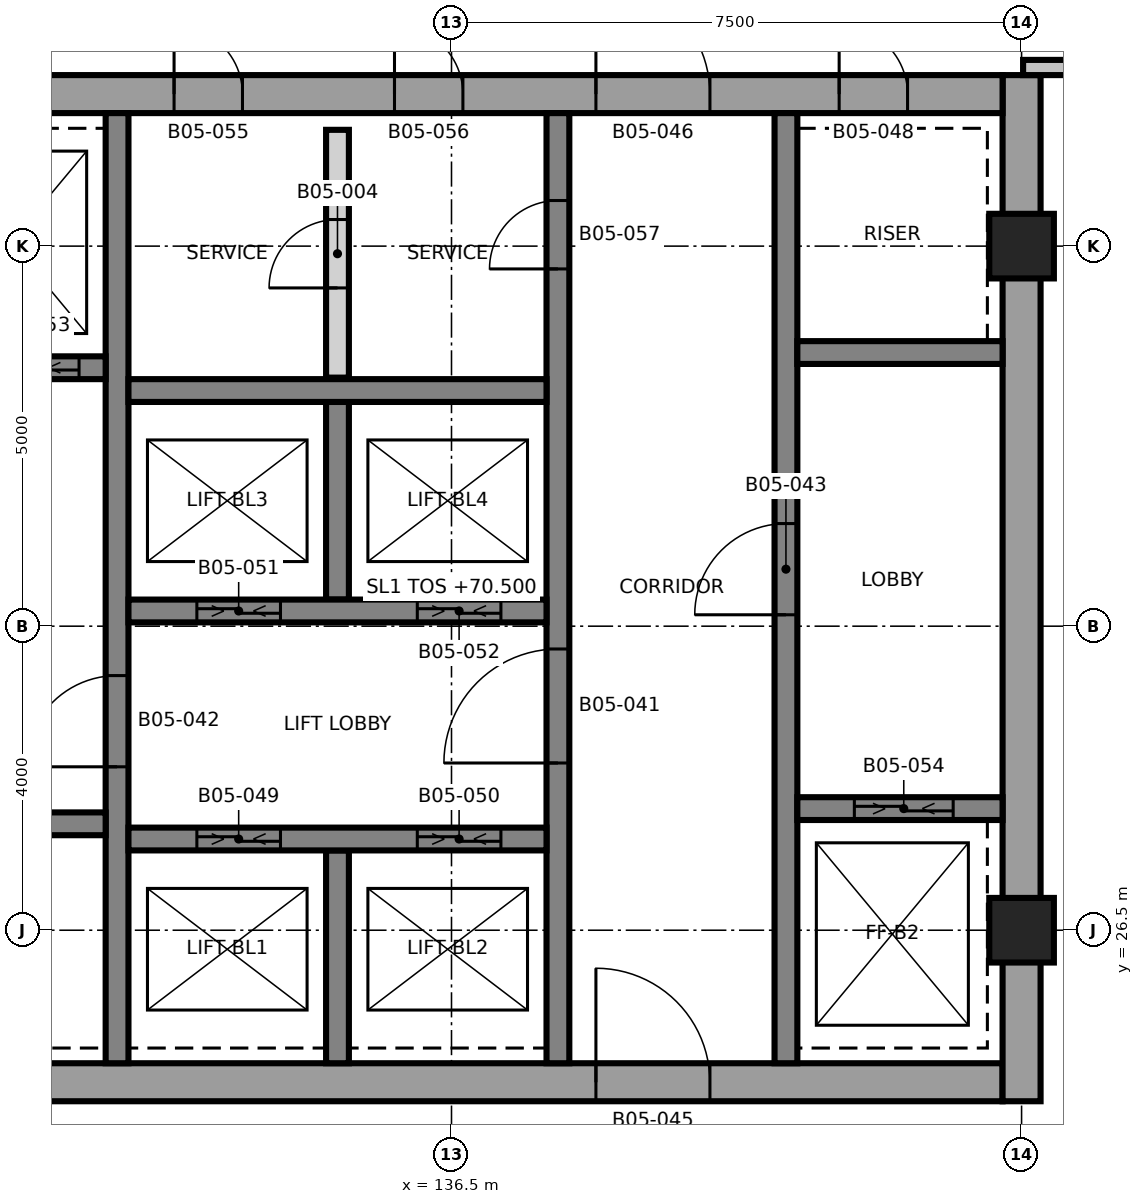
"""IFC4 building model, lengths in metres.
Left out: names, types, materials, properties, quantities, classifications, styles, units other than length and angle.
Written with IfcOpenShell. Run it as: python <this file> out.ifc"""

import sys

from ifc_helpers import new_model, si_unit, direction, frame, frame_2d, origin, origin_2d, place, context, subcontext, project, spatial, rectangle, extrude, element, fill, save


model = new_model("IFC4")
c1 = context("Model", 3, precision=1e-05, world=origin(), true_north=direction((0.0, 1.0)))
c2 = subcontext(c1, "Body", "Model", "MODEL_VIEW")
j1 = project(units=[si_unit("LENGTHUNIT", "METRE"), si_unit("PLANEANGLEUNIT", "RADIAN")], contexts=[c1])
p1 = place(None, origin())
s1 = spatial("IfcSite", under=j1, at=p1, CompositionType="ELEMENT")
p2 = place(p1, origin())
s2 = spatial("IfcBuilding", under=s1, at=p2, CompositionType="ELEMENT")
p3 = place(p2, frame((0.0, 0.0, 70.5)))
s3 = spatial("IfcBuildingStorey", under=s2, at=p3, CompositionType="ELEMENT", Elevation=70.5)
p4 = place(p3, frame((128.75, 24.5, 0.0), z_axis=(0.0, 0.0, 1.0), x_axis=(1.0, 0.0, 0.0)))
e1 = element("IfcWall", 1, at=p4, inside=s3, PredefinedType="SHEAR", context=c2, shape_type="SweptSolid", body=[
    extrude(rectangle(XDim=15.0, YDim=0.5, at=frame_2d((7.5, 0.0))), origin(), (0.0, 0.0, 1.0), 3.7),
])
p5 = place(p4, frame((9.65, 0.0, 0.0)))
e2 = element("IfcOpeningElement", 2, at=p5, cuts=e1, PredefinedType="OPENING", context=c2, shape_type="SweptSolid", body=[
    extrude(rectangle(XDim=1.5, YDim=2.1, at=frame_2d((0.75, 1.05))), frame((0.0, 0.26, 0.0), z_axis=(0.0, -1.0, 0.0), x_axis=(1.0, 0.0, 0.0)), (0.0, 0.0, 1.0), 0.52),
])
p6 = place(p4, frame((1.25, 0.0, 0.0)))
e3 = element("IfcOpeningElement", 3, at=p6, cuts=e1, PredefinedType="OPENING", context=c2, shape_type="SweptSolid", body=[
    extrude(rectangle(XDim=0.9, YDim=2.1, at=frame_2d((0.45, 1.05))), frame((0.0, 0.26, 0.0), z_axis=(0.0, -1.0, 0.0), x_axis=(1.0, 0.0, 0.0)), (0.0, 0.0, 1.0), 0.52),
])
p7 = place(p3, frame((144.0, 24.25, 0.0), z_axis=(0.0, 0.0, 1.0), x_axis=(0.0, 1.0, 0.0)))
e4 = element("IfcWall", 4, at=p7, inside=s3, PredefinedType="SHEAR", context=c2, shape_type="SweptSolid", body=[
    extrude(rectangle(XDim=13.5, YDim=0.5, at=frame_2d((6.75, 0.0))), origin(), (0.0, 0.0, 1.0), 3.7),
])
p8 = place(p3, frame((128.75, 37.5, 0.0), z_axis=(0.0, 0.0, 1.0), x_axis=(1.0, 0.0, 0.0)))
e5 = element("IfcWall", 5, at=p8, inside=s3, PredefinedType="SHEAR", context=c2, shape_type="SweptSolid", body=[
    extrude(rectangle(XDim=15.0, YDim=0.5, at=frame_2d((7.5, 0.0))), origin(), (0.0, 0.0, 1.0), 3.7),
])
p9 = place(p8, frame((9.65, 0.0, 0.0)))
e6 = element("IfcOpeningElement", 6, at=p9, cuts=e5, PredefinedType="OPENING", context=c2, shape_type="SweptSolid", body=[
    extrude(rectangle(XDim=1.5, YDim=2.1, at=frame_2d((0.75, 1.05))), frame((0.0, 0.26, 0.0), z_axis=(0.0, -1.0, 0.0), x_axis=(1.0, 0.0, 0.0)), (0.0, 0.0, 1.0), 0.52),
])
p10 = place(p8, frame((12.85, 0.0, 0.0)))
e7 = element("IfcOpeningElement", 7, at=p10, cuts=e5, PredefinedType="OPENING", context=c2, shape_type="SweptSolid", body=[
    extrude(rectangle(XDim=0.9, YDim=2.1, at=frame_2d((0.45, 1.05))), frame((0.0, 0.26, 0.0), z_axis=(0.0, -1.0, 0.0), x_axis=(1.0, 0.0, 0.0)), (0.0, 0.0, 1.0), 0.52),
])
p11 = place(p8, frame((4.1, 0.0, 0.0)))
e8 = element("IfcOpeningElement", 8, at=p11, cuts=e5, PredefinedType="OPENING", context=c2, shape_type="SweptSolid", body=[
    extrude(rectangle(XDim=0.9, YDim=2.1, at=frame_2d((0.45, 1.05))), frame((0.0, 0.26, 0.0), z_axis=(0.0, -1.0, 0.0), x_axis=(1.0, 0.0, 0.0)), (0.0, 0.0, 1.0), 0.52),
])
p12 = place(p8, frame((7.0, 0.0, 0.0)))
e9 = element("IfcOpeningElement", 9, at=p12, cuts=e5, PredefinedType="OPENING", context=c2, shape_type="SweptSolid", body=[
    extrude(rectangle(XDim=0.9, YDim=2.1, at=frame_2d((0.45, 1.05))), frame((0.0, 0.26, 0.0), z_axis=(0.0, -1.0, 0.0), x_axis=(1.0, 0.0, 0.0)), (0.0, 0.0, 1.0), 0.52),
])
p13 = place(p3, frame((132.1, 24.75, 0.0), z_axis=(0.0, 0.0, 1.0), x_axis=(0.0, 1.0, 0.0)))
e10 = element("IfcWall", 10, at=p13, inside=s3, PredefinedType="SHEAR", context=c2, shape_type="SweptSolid", body=[
    extrude(rectangle(XDim=12.5, YDim=0.3, at=frame_2d((6.25, 0.0))), origin(), (0.0, 0.0, 1.0), 3.7),
])
p14 = place(p13, frame((3.9, 0.0, 0.0)))
e11 = element("IfcOpeningElement", 11, at=p14, cuts=e10, PredefinedType="OPENING", context=c2, shape_type="SweptSolid", body=[
    extrude(rectangle(XDim=1.2, YDim=2.1, at=frame_2d((0.6, 1.05))), frame((0.0, 0.16, 0.0), z_axis=(0.0, -1.0, 0.0), x_axis=(1.0, 0.0, 0.0)), (0.0, 0.0, 1.0), 0.32),
])
p15 = place(p3, frame((137.9, 24.75, 0.0), z_axis=(0.0, 0.0, 1.0), x_axis=(0.0, 1.0, 0.0)))
e12 = element("IfcWall", 12, at=p15, inside=s3, PredefinedType="SHEAR", context=c2, shape_type="SweptSolid", body=[
    extrude(rectangle(XDim=12.5, YDim=0.3, at=frame_2d((6.25, 0.0))), origin(), (0.0, 0.0, 1.0), 3.7),
])
p16 = place(p15, frame((3.95, 0.0, 0.0)))
e13 = element("IfcOpeningElement", 13, at=p16, cuts=e12, PredefinedType="OPENING", context=c2, shape_type="SweptSolid", body=[
    extrude(rectangle(XDim=1.5, YDim=2.1, at=frame_2d((0.75, 1.05))), frame((0.0, 0.16, 0.0), z_axis=(0.0, -1.0, 0.0), x_axis=(1.0, 0.0, 0.0)), (0.0, 0.0, 1.0), 0.32),
])
p17 = place(p15, frame((10.45, 0.0, 0.0)))
e14 = element("IfcOpeningElement", 14, at=p17, cuts=e12, PredefinedType="OPENING", context=c2, shape_type="SweptSolid", body=[
    extrude(rectangle(XDim=0.9, YDim=2.1, at=frame_2d((0.45, 1.05))), frame((0.0, 0.16, 0.0), z_axis=(0.0, -1.0, 0.0), x_axis=(1.0, 0.0, 0.0)), (0.0, 0.0, 1.0), 0.32),
])
p18 = place(p3, frame((140.9, 24.75, 0.0), z_axis=(0.0, 0.0, 1.0), x_axis=(0.0, 1.0, 0.0)))
e15 = element("IfcWall", 15, at=p18, inside=s3, PredefinedType="SHEAR", context=c2, shape_type="SweptSolid", body=[
    extrude(rectangle(XDim=12.5, YDim=0.3, at=frame_2d((6.25, 0.0))), origin(), (0.0, 0.0, 1.0), 3.7),
])
p19 = place(p18, frame((5.9, 0.0, 0.0)))
e16 = element("IfcOpeningElement", 16, at=p19, cuts=e15, PredefinedType="OPENING", context=c2, shape_type="SweptSolid", body=[
    extrude(rectangle(XDim=1.2, YDim=2.1, at=frame_2d((0.6, 1.05))), frame((0.0, 0.16, 0.0), z_axis=(0.0, -1.0, 0.0), x_axis=(1.0, 0.0, 0.0)), (0.0, 0.0, 1.0), 0.32),
])
p20 = place(p3, frame((135.0, 24.75, 0.0), z_axis=(0.0, 0.0, 1.0), x_axis=(0.0, 1.0, 0.0)))
e17 = element("IfcWall", 17, at=p20, inside=s3, PredefinedType="SHEAR", context=c2, shape_type="SweptSolid", body=[
    extrude(rectangle(XDim=2.8, YDim=0.3, at=frame_2d((1.4, 0.0))), origin(), (0.0, 0.0, 1.0), 3.7),
])
p21 = place(p3, frame((135.0, 30.85, 0.0), z_axis=(0.0, 0.0, 1.0), x_axis=(0.0, 1.0, 0.0)))
e18 = element("IfcWall", 18, at=p21, inside=s3, PredefinedType="SHEAR", context=c2, shape_type="SweptSolid", body=[
    extrude(rectangle(XDim=2.6, YDim=0.3, at=frame_2d((1.3, 0.0))), origin(), (0.0, 0.0, 1.0), 3.7),
])
p22 = place(p3, frame((132.25, 27.7, 0.0), z_axis=(0.0, 0.0, 1.0), x_axis=(1.0, 0.0, 0.0)))
e19 = element("IfcWall", 19, at=p22, inside=s3, PredefinedType="SHEAR", context=c2, shape_type="SweptSolid", body=[
    extrude(rectangle(XDim=5.5, YDim=0.3, at=frame_2d((2.75, 0.0))), origin(), (0.0, 0.0, 1.0), 3.7),
])
p23 = place(p22, frame((0.9, 0.0, 0.0)))
e20 = element("IfcOpeningElement", 20, at=p23, cuts=e19, PredefinedType="OPENING", context=c2, shape_type="SweptSolid", body=[
    extrude(rectangle(XDim=1.1, YDim=2.4, at=frame_2d((0.55, 1.2))), frame((0.0, 0.16, 0.0), z_axis=(0.0, -1.0, 0.0), x_axis=(1.0, 0.0, 0.0)), (0.0, 0.0, 1.0), 0.32),
])
p24 = place(p22, frame((3.8, 0.0, 0.0)))
e21 = element("IfcOpeningElement", 21, at=p24, cuts=e19, PredefinedType="OPENING", context=c2, shape_type="SweptSolid", body=[
    extrude(rectangle(XDim=1.1, YDim=2.4, at=frame_2d((0.55, 1.2))), frame((0.0, 0.16, 0.0), z_axis=(0.0, -1.0, 0.0), x_axis=(1.0, 0.0, 0.0)), (0.0, 0.0, 1.0), 0.32),
])
p25 = place(p3, frame((132.25, 30.7, 0.0), z_axis=(0.0, 0.0, 1.0), x_axis=(1.0, 0.0, 0.0)))
e22 = element("IfcWall", 22, at=p25, inside=s3, PredefinedType="SHEAR", context=c2, shape_type="SweptSolid", body=[
    extrude(rectangle(XDim=5.5, YDim=0.3, at=frame_2d((2.75, 0.0))), origin(), (0.0, 0.0, 1.0), 3.7),
])
p26 = place(p25, frame((0.9, 0.0, 0.0)))
e23 = element("IfcOpeningElement", 23, at=p26, cuts=e22, PredefinedType="OPENING", context=c2, shape_type="SweptSolid", body=[
    extrude(rectangle(XDim=1.1, YDim=2.4, at=frame_2d((0.55, 1.2))), frame((0.0, 0.16, 0.0), z_axis=(0.0, -1.0, 0.0), x_axis=(1.0, 0.0, 0.0)), (0.0, 0.0, 1.0), 0.32),
])
p27 = place(p25, frame((3.8, 0.0, 0.0)))
e24 = element("IfcOpeningElement", 24, at=p27, cuts=e22, PredefinedType="OPENING", context=c2, shape_type="SweptSolid", body=[
    extrude(rectangle(XDim=1.1, YDim=2.4, at=frame_2d((0.55, 1.2))), frame((0.0, 0.16, 0.0), z_axis=(0.0, -1.0, 0.0), x_axis=(1.0, 0.0, 0.0)), (0.0, 0.0, 1.0), 0.32),
])
p28 = place(p3, frame((132.25, 33.6, 0.0), z_axis=(0.0, 0.0, 1.0), x_axis=(1.0, 0.0, 0.0)))
e25 = element("IfcWall", 25, at=p28, inside=s3, PredefinedType="SHEAR", context=c2, shape_type="SweptSolid", body=[
    extrude(rectangle(XDim=5.5, YDim=0.3, at=frame_2d((2.75, 0.0))), origin(), (0.0, 0.0, 1.0), 3.7),
])
p29 = place(p3, frame((129.25, 27.9, 0.0), z_axis=(0.0, 0.0, 1.0), x_axis=(1.0, 0.0, 0.0)))
e26 = element("IfcWall", 26, at=p29, inside=s3, PredefinedType="SHEAR", context=c2, shape_type="SweptSolid", body=[
    extrude(rectangle(XDim=2.7, YDim=0.3, at=frame_2d((1.35, 0.0))), origin(), (0.0, 0.0, 1.0), 3.7),
])
p30 = place(p3, frame((129.25, 33.9, 0.0), z_axis=(0.0, 0.0, 1.0), x_axis=(1.0, 0.0, 0.0)))
e27 = element("IfcWall", 27, at=p30, inside=s3, PredefinedType="SHEAR", context=c2, shape_type="SweptSolid", body=[
    extrude(rectangle(XDim=2.7, YDim=0.3, at=frame_2d((1.35, 0.0))), origin(), (0.0, 0.0, 1.0), 3.7),
])
p31 = place(p30, frame((1.05, 0.0, 0.0)))
e28 = element("IfcOpeningElement", 28, at=p31, cuts=e27, PredefinedType="OPENING", context=c2, shape_type="SweptSolid", body=[
    extrude(rectangle(XDim=1.3, YDim=2.4, at=frame_2d((0.65, 1.2))), frame((0.0, 0.16, 0.0), z_axis=(0.0, -1.0, 0.0), x_axis=(1.0, 0.0, 0.0)), (0.0, 0.0, 1.0), 0.32),
])
p32 = place(p3, frame((141.05, 28.1, 0.0), z_axis=(0.0, 0.0, 1.0), x_axis=(1.0, 0.0, 0.0)))
e29 = element("IfcWall", 29, at=p32, inside=s3, PredefinedType="SHEAR", context=c2, shape_type="SweptSolid", body=[
    extrude(rectangle(XDim=2.7, YDim=0.3, at=frame_2d((1.35, 0.0))), origin(), (0.0, 0.0, 1.0), 3.7),
])
p33 = place(p32, frame((0.75, 0.0, 0.0)))
e30 = element("IfcOpeningElement", 30, at=p33, cuts=e29, PredefinedType="OPENING", context=c2, shape_type="SweptSolid", body=[
    extrude(rectangle(XDim=1.3, YDim=2.4, at=frame_2d((0.65, 1.2))), frame((0.0, 0.16, 0.0), z_axis=(0.0, -1.0, 0.0), x_axis=(1.0, 0.0, 0.0)), (0.0, 0.0, 1.0), 0.32),
])
p34 = place(p3, frame((141.05, 34.1, 0.0), z_axis=(0.0, 0.0, 1.0), x_axis=(1.0, 0.0, 0.0)))
e31 = element("IfcWall", 31, at=p34, inside=s3, PredefinedType="SHEAR", context=c2, shape_type="SweptSolid", body=[
    extrude(rectangle(XDim=2.7, YDim=0.3, at=frame_2d((1.35, 0.0))), origin(), (0.0, 0.0, 1.0), 3.7),
])
for number, where, z_axis, x_axis in (
    (32, (144.0, 26.5, 0.0), (0.0, 0.0, 1.0), (1.0, 0.0, 0.0)),
    (33, (144.0, 35.5, 0.0), (0.0, 0.0, 1.0), (1.0, 0.0, 0.0)),
):
    element("IfcColumn", number, at=place(p3, frame(where, z_axis=z_axis, x_axis=x_axis)), inside=s3, PredefinedType="COLUMN", context=c2, shape_type="SweptSolid", body=[
        extrude(rectangle(XDim=0.85, YDim=0.85, at=origin_2d()), origin(), (0.0, 0.0, 1.0), 3.7),
    ])
p35 = place(p3, frame((144.02, 37.85, 0.0), z_axis=(0.0, 0.0, 1.0), x_axis=(1.0, 0.0, 0.0)))
e34 = element("IfcWall", 34, at=p35, inside=s3, PredefinedType="PARTITIONING", context=c2, shape_type="SweptSolid", body=[
    extrude(rectangle(XDim=3.23, YDim=0.2, at=frame_2d((1.615, 0.0))), origin(), (0.0, 0.0, 1.0), 3.4),
])
p36 = place(p35, frame((1.03, 0.0, 0.0)))
e35 = element("IfcOpeningElement", 35, at=p36, cuts=e34, PredefinedType="OPENING", context=c2, shape_type="SweptSolid", body=[
    extrude(rectangle(XDim=1.5, YDim=2.1, at=frame_2d((0.75, 1.05))), frame((0.0, 0.11, 0.0), z_axis=(0.0, -1.0, 0.0), x_axis=(1.0, 0.0, 0.0)), (0.0, 0.0, 1.0), 0.22),
])
p37 = place(p3, frame((135.0, 33.77, 0.0), z_axis=(0.0, 0.0, 1.0), x_axis=(0.0, 1.0, 0.0)))
e36 = element("IfcWall", 36, at=p37, inside=s3, PredefinedType="PARTITIONING", context=c2, shape_type="SweptSolid", body=[
    extrude(rectangle(XDim=3.26, YDim=0.3, at=frame_2d((1.63, 0.0))), origin(), (0.0, 0.0, 1.0), 3.4),
])
p38 = place(p37, frame((1.18, 0.0, 0.0)))
e37 = element("IfcOpeningElement", 37, at=p38, cuts=e36, PredefinedType="OPENING", context=c2, shape_type="SweptSolid", body=[
    extrude(rectangle(XDim=0.9, YDim=2.1, at=frame_2d((0.45, 1.05))), frame((0.0, 0.16, 0.0), z_axis=(0.0, -1.0, 0.0), x_axis=(1.0, 0.0, 0.0)), (0.0, 0.0, 1.0), 0.32),
])
p39 = place(p38, origin())
e38 = element("IfcDoor", 38, at=p39, inside=s3, OperationType="SINGLE_SWING_RIGHT", PredefinedType="DOOR", context=c2, shape_type="SweptSolid", body=[
    extrude(rectangle(XDim=0.9, YDim=2.1, at=frame_2d((0.45, 1.05))), frame((0.0, 0.025, 0.0), z_axis=(0.0, -1.0, 0.0), x_axis=(1.0, 0.0, 0.0)), (0.0, 0.0, 1.0), 0.05),
])
fill(e37, e38)
p40 = place(p16, origin())
e39 = element("IfcDoor", 39, at=p40, inside=s3, OperationType="SINGLE_SWING_RIGHT", PredefinedType="DOOR", context=c2, shape_type="SweptSolid", body=[
    extrude(rectangle(XDim=1.5, YDim=2.1, at=frame_2d((0.75, 1.05))), frame((0.0, 0.025, 0.0), z_axis=(0.0, -1.0, 0.0), x_axis=(1.0, 0.0, 0.0)), (0.0, 0.0, 1.0), 0.05),
])
fill(e13, e39)
p41 = place(p14, origin())
e40 = element("IfcDoor", 40, at=p41, inside=s3, OperationType="SINGLE_SWING_LEFT", PredefinedType="DOOR", context=c2, shape_type="SweptSolid", body=[
    extrude(rectangle(XDim=1.2, YDim=2.1, at=frame_2d((0.6, 1.05))), frame((0.0, 0.025, 0.0), z_axis=(0.0, -1.0, 0.0), x_axis=(1.0, 0.0, 0.0)), (0.0, 0.0, 1.0), 0.05),
])
fill(e11, e40)
p42 = place(p19, origin())
e41 = element("IfcDoor", 41, at=p42, inside=s3, OperationType="SINGLE_SWING_RIGHT", PredefinedType="DOOR", context=c2, shape_type="SweptSolid", body=[
    extrude(rectangle(XDim=1.2, YDim=2.1, at=frame_2d((0.6, 1.05))), frame((0.0, 0.025, 0.0), z_axis=(0.0, -1.0, 0.0), x_axis=(1.0, 0.0, 0.0)), (0.0, 0.0, 1.0), 0.05),
])
fill(e16, e41)
p43 = place(p5, origin())
e42 = element("IfcDoor", 42, at=p43, inside=s3, OperationType="SINGLE_SWING_LEFT", PredefinedType="DOOR", context=c2, shape_type="SweptSolid", body=[
    extrude(rectangle(XDim=1.5, YDim=2.1, at=frame_2d((0.75, 1.05))), frame((0.0, 0.025, 0.0), z_axis=(0.0, -1.0, 0.0), x_axis=(1.0, 0.0, 0.0)), (0.0, 0.0, 1.0), 0.05),
])
fill(e2, e42)
p44 = place(p9, origin())
e43 = element("IfcDoor", 43, at=p44, inside=s3, OperationType="SINGLE_SWING_RIGHT", PredefinedType="DOOR", context=c2, shape_type="SweptSolid", body=[
    extrude(rectangle(XDim=1.5, YDim=2.1, at=frame_2d((0.75, 1.05))), frame((0.0, 0.025, 0.0), z_axis=(0.0, -1.0, 0.0), x_axis=(1.0, 0.0, 0.0)), (0.0, 0.0, 1.0), 0.05),
])
fill(e6, e43)
p45 = place(p10, origin())
e44 = element("IfcDoor", 44, at=p45, inside=s3, OperationType="SINGLE_SWING_RIGHT", PredefinedType="DOOR", context=c2, shape_type="SweptSolid", body=[
    extrude(rectangle(XDim=0.9, YDim=2.1, at=frame_2d((0.45, 1.05))), frame((0.0, 0.025, 0.0), z_axis=(0.0, -1.0, 0.0), x_axis=(1.0, 0.0, 0.0)), (0.0, 0.0, 1.0), 0.05),
])
fill(e7, e44)
p46 = place(p23, origin())
e45 = element("IfcDoor", 45, at=p46, inside=s3, OperationType="SLIDING_TO_LEFT", PredefinedType="DOOR", context=c2, shape_type="SweptSolid", body=[
    extrude(rectangle(XDim=1.1, YDim=2.4, at=frame_2d((0.55, 1.2))), frame((0.0, 0.025, 0.0), z_axis=(0.0, -1.0, 0.0), x_axis=(1.0, 0.0, 0.0)), (0.0, 0.0, 1.0), 0.05),
])
fill(e20, e45)
p47 = place(p24, origin())
e46 = element("IfcDoor", 46, at=p47, inside=s3, OperationType="SLIDING_TO_LEFT", PredefinedType="DOOR", context=c2, shape_type="SweptSolid", body=[
    extrude(rectangle(XDim=1.1, YDim=2.4, at=frame_2d((0.55, 1.2))), frame((0.0, 0.025, 0.0), z_axis=(0.0, -1.0, 0.0), x_axis=(1.0, 0.0, 0.0)), (0.0, 0.0, 1.0), 0.05),
])
fill(e21, e46)
p48 = place(p26, origin())
e47 = element("IfcDoor", 47, at=p48, inside=s3, OperationType="SLIDING_TO_LEFT", PredefinedType="DOOR", context=c2, shape_type="SweptSolid", body=[
    extrude(rectangle(XDim=1.1, YDim=2.4, at=frame_2d((0.55, 1.2))), frame((0.0, 0.025, 0.0), z_axis=(0.0, -1.0, 0.0), x_axis=(1.0, 0.0, 0.0)), (0.0, 0.0, 1.0), 0.05),
])
fill(e23, e47)
p49 = place(p27, origin())
e48 = element("IfcDoor", 48, at=p49, inside=s3, OperationType="SLIDING_TO_LEFT", PredefinedType="DOOR", context=c2, shape_type="SweptSolid", body=[
    extrude(rectangle(XDim=1.1, YDim=2.4, at=frame_2d((0.55, 1.2))), frame((0.0, 0.025, 0.0), z_axis=(0.0, -1.0, 0.0), x_axis=(1.0, 0.0, 0.0)), (0.0, 0.0, 1.0), 0.05),
])
fill(e24, e48)
p50 = place(p31, origin())
e49 = element("IfcDoor", 49, at=p50, inside=s3, OperationType="SLIDING_TO_LEFT", PredefinedType="DOOR", context=c2, shape_type="SweptSolid", body=[
    extrude(rectangle(XDim=1.3, YDim=2.4, at=frame_2d((0.65, 1.2))), frame((0.0, 0.025, 0.0), z_axis=(0.0, -1.0, 0.0), x_axis=(1.0, 0.0, 0.0)), (0.0, 0.0, 1.0), 0.05),
])
fill(e28, e49)
p51 = place(p33, origin())
e50 = element("IfcDoor", 50, at=p51, inside=s3, OperationType="SLIDING_TO_LEFT", PredefinedType="DOOR", context=c2, shape_type="SweptSolid", body=[
    extrude(rectangle(XDim=1.3, YDim=2.4, at=frame_2d((0.65, 1.2))), frame((0.0, 0.025, 0.0), z_axis=(0.0, -1.0, 0.0), x_axis=(1.0, 0.0, 0.0)), (0.0, 0.0, 1.0), 0.05),
])
fill(e30, e50)
p52 = place(p11, origin())
e51 = element("IfcDoor", 51, at=p52, inside=s3, OperationType="SINGLE_SWING_LEFT", PredefinedType="DOOR", context=c2, shape_type="SweptSolid", body=[
    extrude(rectangle(XDim=0.9, YDim=2.1, at=frame_2d((0.45, 1.05))), frame((0.0, 0.025, 0.0), z_axis=(0.0, -1.0, 0.0), x_axis=(1.0, 0.0, 0.0)), (0.0, 0.0, 1.0), 0.05),
])
fill(e8, e51)
p53 = place(p12, origin())
e52 = element("IfcDoor", 52, at=p53, inside=s3, OperationType="SINGLE_SWING_RIGHT", PredefinedType="DOOR", context=c2, shape_type="SweptSolid", body=[
    extrude(rectangle(XDim=0.9, YDim=2.1, at=frame_2d((0.45, 1.05))), frame((0.0, 0.025, 0.0), z_axis=(0.0, -1.0, 0.0), x_axis=(1.0, 0.0, 0.0)), (0.0, 0.0, 1.0), 0.05),
])
fill(e9, e52)
p54 = place(p17, origin())
e53 = element("IfcDoor", 53, at=p54, inside=s3, OperationType="SINGLE_SWING_RIGHT", PredefinedType="DOOR", context=c2, shape_type="SweptSolid", body=[
    extrude(rectangle(XDim=0.9, YDim=2.1, at=frame_2d((0.45, 1.05))), frame((0.0, 0.025, 0.0), z_axis=(0.0, -1.0, 0.0), x_axis=(1.0, 0.0, 0.0)), (0.0, 0.0, 1.0), 0.05),
])
fill(e14, e53)
save(model, sys.argv[1])
